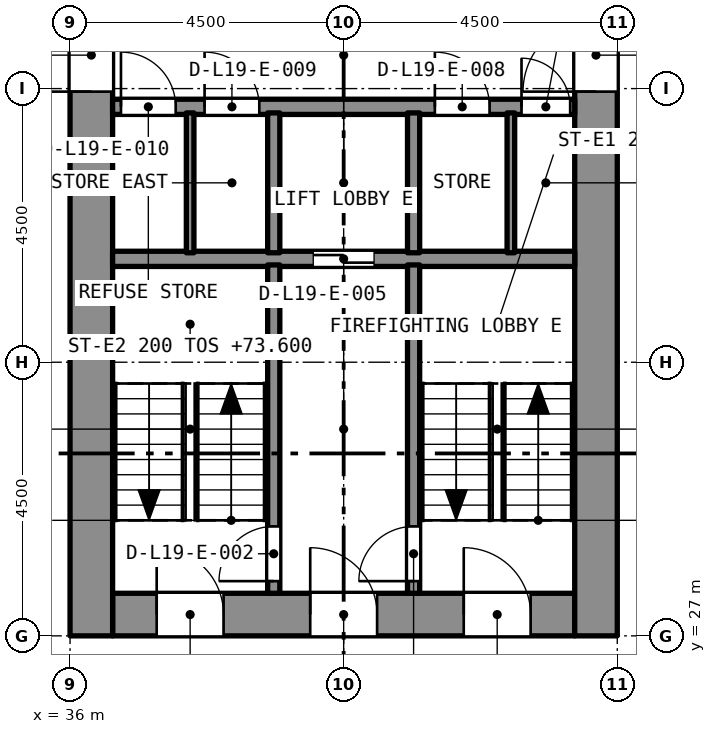
"""IFC4 building model, lengths in metres.
Left out: names, types, materials, properties, quantities, classifications, styles, units other than length and angle.
Written with IfcOpenShell. Run it as: python <this file> out.ifc"""

import sys

from ifc_helpers import new_model, si_unit, direction, frame, frame_2d, origin, place, context, subcontext, project, spatial, rectangle, extrude, element, fill, save


model = new_model("IFC4")
c1 = context("Model", 3, precision=1e-05, world=origin(), true_north=direction((0.0, 1.0)))
c2 = subcontext(c1, "Body", "Model", "MODEL_VIEW")
j1 = project(units=[si_unit("LENGTHUNIT", "METRE"), si_unit("PLANEANGLEUNIT", "RADIAN")], contexts=[c1])
p1 = place(None, origin())
s1 = spatial("IfcSite", under=j1, at=p1, CompositionType="ELEMENT")
p2 = place(p1, origin())
s2 = spatial("IfcBuilding", under=s1, at=p2, CompositionType="ELEMENT")
p3 = place(p2, frame((0.0, 0.0, 72.0)))
s3 = spatial("IfcBuildingStorey", under=s2, at=p3, CompositionType="ELEMENT", Elevation=72.0)
p4 = place(p3, frame((36.7, 27.35, 0.0), z_axis=(0.0, 0.0, 1.0), x_axis=(1.0, 0.0, 0.0)))
e1 = element("IfcWall", 1, at=p4, inside=s3, PredefinedType="SOLIDWALL", context=c2, shape_type="SweptSolid", body=[
    extrude(rectangle(XDim=7.6, YDim=0.7, at=frame_2d((3.8, 0.0))), origin(), (0.0, 0.0, 1.0), 3.2),
])
p5 = place(p4, frame((5.775, 0.0, 0.0)))
e2 = element("IfcOpeningElement", 2, at=p5, cuts=e1, PredefinedType="OPENING", context=c2, shape_type="SweptSolid", body=[
    extrude(rectangle(XDim=1.1, YDim=2.1, at=frame_2d((0.55, 1.05))), frame((0.0, 0.36, 0.0), z_axis=(0.0, -1.0, 0.0), x_axis=(1.0, 0.0, 0.0)), (0.0, 0.0, 1.0), 0.72),
])
p6 = place(p4, frame((3.25, 0.0, 0.0)))
e3 = element("IfcOpeningElement", 3, at=p6, cuts=e1, PredefinedType="OPENING", context=c2, shape_type="SweptSolid", body=[
    extrude(rectangle(XDim=1.1, YDim=2.1, at=frame_2d((0.55, 1.05))), frame((0.0, 0.36, 0.0), z_axis=(0.0, -1.0, 0.0), x_axis=(1.0, 0.0, 0.0)), (0.0, 0.0, 1.0), 0.72),
])
p7 = place(p4, frame((0.725, 0.0, 0.0)))
e4 = element("IfcOpeningElement", 4, at=p7, cuts=e1, PredefinedType="OPENING", context=c2, shape_type="SweptSolid", body=[
    extrude(rectangle(XDim=1.1, YDim=2.1, at=frame_2d((0.55, 1.05))), frame((0.0, 0.36, 0.0), z_axis=(0.0, -1.0, 0.0), x_axis=(1.0, 0.0, 0.0)), (0.0, 0.0, 1.0), 0.72),
])
p8 = place(p3, frame((36.35, 27.0, 0.0), z_axis=(0.0, 0.0, 1.0), x_axis=(0.0, 1.0, 0.0)))
e5 = element("IfcWall", 5, at=p8, inside=s3, PredefinedType="SOLIDWALL", context=c2, shape_type="SweptSolid", body=[
    extrude(rectangle(XDim=13.5, YDim=0.7, at=frame_2d((6.75, 0.0))), origin(), (0.0, 0.0, 1.0), 3.2),
])
p9 = place(p8, frame((8.95, 0.0, 0.0)))
e6 = element("IfcOpeningElement", 6, at=p9, cuts=e5, PredefinedType="OPENING", context=c2, shape_type="SweptSolid", body=[
    extrude(rectangle(XDim=1.2, YDim=2.1, at=frame_2d((0.6, 1.05))), frame((0.0, 0.36, 0.0), z_axis=(0.0, -1.0, 0.0), x_axis=(1.0, 0.0, 0.0)), (0.0, 0.0, 1.0), 0.72),
])
p10 = place(p3, frame((44.65, 27.0, 0.0), z_axis=(0.0, 0.0, 1.0), x_axis=(0.0, 1.0, 0.0)))
e7 = element("IfcWall", 7, at=p10, inside=s3, PredefinedType="SOLIDWALL", context=c2, shape_type="SweptSolid", body=[
    extrude(rectangle(XDim=13.5, YDim=0.7, at=frame_2d((6.75, 0.0))), origin(), (0.0, 0.0, 1.0), 3.2),
])
p11 = place(p10, frame((8.95, 0.0, 0.0)))
e8 = element("IfcOpeningElement", 8, at=p11, cuts=e7, PredefinedType="OPENING", context=c2, shape_type="SweptSolid", body=[
    extrude(rectangle(XDim=1.2, YDim=2.1, at=frame_2d((0.6, 1.05))), frame((0.0, 0.36, 0.0), z_axis=(0.0, -1.0, 0.0), x_axis=(1.0, 0.0, 0.0)), (0.0, 0.0, 1.0), 0.72),
])
p12 = place(p3, frame((36.7, 33.2, 0.0), z_axis=(0.0, 0.0, 1.0), x_axis=(1.0, 0.0, 0.0)))
e9 = element("IfcWall", 9, at=p12, inside=s3, PredefinedType="SOLIDWALL", context=c2, shape_type="SweptSolid", body=[
    extrude(rectangle(XDim=7.6, YDim=0.25, at=frame_2d((3.8, 0.0))), origin(), (0.0, 0.0, 1.0), 2.7),
])
p13 = place(p12, frame((3.3, 0.0, 0.0)))
e10 = element("IfcOpeningElement", 10, at=p13, cuts=e9, PredefinedType="OPENING", context=c2, shape_type="SweptSolid", body=[
    extrude(rectangle(XDim=1.0, YDim=2.1, at=frame_2d((0.5, 1.05))), frame((0.0, 0.135, 0.0), z_axis=(0.0, -1.0, 0.0), x_axis=(1.0, 0.0, 0.0)), (0.0, 0.0, 1.0), 0.27),
])
p14 = place(p3, frame((36.7, 35.7, 0.0), z_axis=(0.0, 0.0, 1.0), x_axis=(1.0, 0.0, 0.0)))
e11 = element("IfcWall", 11, at=p14, inside=s3, PredefinedType="SOLIDWALL", context=c2, shape_type="SweptSolid", body=[
    extrude(rectangle(XDim=7.6, YDim=0.25, at=frame_2d((3.8, 0.0))), origin(), (0.0, 0.0, 1.0), 2.7),
])
p15 = place(p14, frame((6.725, 0.0, 0.0)))
e12 = element("IfcOpeningElement", 12, at=p15, cuts=e11, PredefinedType="OPENING", context=c2, shape_type="SweptSolid", body=[
    extrude(rectangle(XDim=0.8, YDim=2.1, at=frame_2d((0.4, 1.05))), frame((0.0, 0.135, 0.0), z_axis=(0.0, -1.0, 0.0), x_axis=(1.0, 0.0, 0.0)), (0.0, 0.0, 1.0), 0.27),
])
p16 = place(p14, frame((5.3, 0.0, 0.0)))
e13 = element("IfcOpeningElement", 13, at=p16, cuts=e11, PredefinedType="OPENING", context=c2, shape_type="SweptSolid", body=[
    extrude(rectangle(XDim=0.9, YDim=2.1, at=frame_2d((0.45, 1.05))), frame((0.0, 0.135, 0.0), z_axis=(0.0, -1.0, 0.0), x_axis=(1.0, 0.0, 0.0)), (0.0, 0.0, 1.0), 0.27),
])
p17 = place(p14, frame((1.512, 0.0, 0.0)))
e14 = element("IfcOpeningElement", 14, at=p17, cuts=e11, PredefinedType="OPENING", context=c2, shape_type="SweptSolid", body=[
    extrude(rectangle(XDim=0.9, YDim=2.1, at=frame_2d((0.45, 1.05))), frame((0.0, 0.135, 0.0), z_axis=(0.0, -1.0, 0.0), x_axis=(1.0, 0.0, 0.0)), (0.0, 0.0, 1.0), 0.27),
])
p18 = place(p14, frame((0.137, 0.0, 0.0)))
e15 = element("IfcOpeningElement", 15, at=p18, cuts=e11, PredefinedType="OPENING", context=c2, shape_type="SweptSolid", body=[
    extrude(rectangle(XDim=0.9, YDim=2.1, at=frame_2d((0.45, 1.05))), frame((0.0, 0.135, 0.0), z_axis=(0.0, -1.0, 0.0), x_axis=(1.0, 0.0, 0.0)), (0.0, 0.0, 1.0), 0.27),
])
p19 = place(p3, frame((41.65, 27.7, 0.0), z_axis=(0.0, 0.0, 1.0), x_axis=(0.0, 1.0, 0.0)))
e16 = element("IfcWall", 16, at=p19, inside=s3, PredefinedType="SOLIDWALL", context=c2, shape_type="SweptSolid", body=[
    extrude(rectangle(XDim=5.4, YDim=0.2, at=frame_2d((2.7, 0.0))), origin(), (0.0, 0.0, 1.0), 2.7),
])
p20 = place(p19, frame((0.2, 0.0, 0.0)))
e17 = element("IfcOpeningElement", 17, at=p20, cuts=e16, PredefinedType="OPENING", context=c2, shape_type="SweptSolid", body=[
    extrude(rectangle(XDim=0.9, YDim=2.1, at=frame_2d((0.45, 1.05))), frame((0.0, 0.11, 0.0), z_axis=(0.0, -1.0, 0.0), x_axis=(1.0, 0.0, 0.0)), (0.0, 0.0, 1.0), 0.22),
])
p21 = place(p3, frame((39.35, 27.7, 0.0), z_axis=(0.0, 0.0, 1.0), x_axis=(0.0, 1.0, 0.0)))
e18 = element("IfcWall", 18, at=p21, inside=s3, PredefinedType="SOLIDWALL", context=c2, shape_type="SweptSolid", body=[
    extrude(rectangle(XDim=5.4, YDim=0.2, at=frame_2d((2.7, 0.0))), origin(), (0.0, 0.0, 1.0), 2.7),
])
p22 = place(p21, frame((0.2, 0.0, 0.0)))
e19 = element("IfcOpeningElement", 19, at=p22, cuts=e18, PredefinedType="OPENING", context=c2, shape_type="SweptSolid", body=[
    extrude(rectangle(XDim=0.9, YDim=2.1, at=frame_2d((0.45, 1.05))), frame((0.0, 0.11, 0.0), z_axis=(0.0, -1.0, 0.0), x_axis=(1.0, 0.0, 0.0)), (0.0, 0.0, 1.0), 0.22),
])
for number, where, z_axis, x_axis in (
    (20, (41.65, 33.3, 0.0), (0.0, 0.0, 1.0), (0.0, 1.0, 0.0)),
    (21, (39.35, 33.3, 0.0), (0.0, 0.0, 1.0), (0.0, 1.0, 0.0)),
):
    element("IfcWall", number, at=place(p3, frame(where, z_axis=z_axis, x_axis=x_axis)), inside=s3, PredefinedType="SOLIDWALL", context=c2, shape_type="SweptSolid", body=[
        extrude(rectangle(XDim=2.3, YDim=0.2, at=frame_2d((1.15, 0.0))), origin(), (0.0, 0.0, 1.0), 2.7),
    ])
for number, where, z_axis, x_axis in (
    (22, (43.25, 33.3, 0.0), (0.0, 0.0, 1.0), (0.0, 1.0, 0.0)),
    (23, (37.975, 33.3, 0.0), (0.0, 0.0, 1.0), (0.0, 1.0, 0.0)),
):
    element("IfcWall", number, at=place(p3, frame(where, z_axis=z_axis, x_axis=x_axis)), inside=s3, PredefinedType="PARTITIONING", context=c2, shape_type="SweptSolid", body=[
        extrude(rectangle(XDim=2.3, YDim=0.125, at=frame_2d((1.15, 0.0))), origin(), (0.0, 0.0, 1.0), 2.7),
    ])
p23 = place(p20, origin())
e24 = element("IfcDoor", 24, at=p23, inside=s3, OperationType="SINGLE_SWING_LEFT", PredefinedType="DOOR", context=c2, shape_type="SweptSolid", body=[
    extrude(rectangle(XDim=0.9, YDim=2.1, at=frame_2d((0.45, 1.05))), frame((0.0, 0.025, 0.0), z_axis=(0.0, -1.0, 0.0), x_axis=(1.0, 0.0, 0.0)), (0.0, 0.0, 1.0), 0.05),
])
fill(e17, e24)
p24 = place(p22, origin())
e25 = element("IfcDoor", 25, at=p24, inside=s3, OperationType="SINGLE_SWING_LEFT", PredefinedType="DOOR", context=c2, shape_type="SweptSolid", body=[
    extrude(rectangle(XDim=0.9, YDim=2.1, at=frame_2d((0.45, 1.05))), frame((0.0, 0.025, 0.0), z_axis=(0.0, -1.0, 0.0), x_axis=(1.0, 0.0, 0.0)), (0.0, 0.0, 1.0), 0.05),
])
fill(e19, e25)
p25 = place(p13, origin())
e26 = element("IfcDoor", 26, at=p25, inside=s3, OperationType="SLIDING_TO_LEFT", PredefinedType="DOOR", context=c2, shape_type="SweptSolid", body=[
    extrude(rectangle(XDim=1.0, YDim=2.1, at=frame_2d((0.5, 1.05))), frame((0.0, 0.025, 0.0), z_axis=(0.0, -1.0, 0.0), x_axis=(1.0, 0.0, 0.0)), (0.0, 0.0, 1.0), 0.05),
])
fill(e10, e26)
p26 = place(p15, origin())
e27 = element("IfcDoor", 27, at=p26, inside=s3, OperationType="SINGLE_SWING_LEFT", PredefinedType="DOOR", context=c2, shape_type="SweptSolid", body=[
    extrude(rectangle(XDim=0.8, YDim=2.1, at=frame_2d((0.4, 1.05))), frame((0.0, 0.025, 0.0), z_axis=(0.0, -1.0, 0.0), x_axis=(1.0, 0.0, 0.0)), (0.0, 0.0, 1.0), 0.05),
])
fill(e12, e27)
p27 = place(p16, origin())
e28 = element("IfcDoor", 28, at=p27, inside=s3, OperationType="SINGLE_SWING_LEFT", PredefinedType="DOOR", context=c2, shape_type="SweptSolid", body=[
    extrude(rectangle(XDim=0.9, YDim=2.1, at=frame_2d((0.45, 1.05))), frame((0.0, 0.025, 0.0), z_axis=(0.0, -1.0, 0.0), x_axis=(1.0, 0.0, 0.0)), (0.0, 0.0, 1.0), 0.05),
])
fill(e13, e28)
p28 = place(p17, origin())
e29 = element("IfcDoor", 29, at=p28, inside=s3, OperationType="SINGLE_SWING_LEFT", PredefinedType="DOOR", context=c2, shape_type="SweptSolid", body=[
    extrude(rectangle(XDim=0.9, YDim=2.1, at=frame_2d((0.45, 1.05))), frame((0.0, 0.025, 0.0), z_axis=(0.0, -1.0, 0.0), x_axis=(1.0, 0.0, 0.0)), (0.0, 0.0, 1.0), 0.05),
])
fill(e14, e29)
p29 = place(p18, origin())
e30 = element("IfcDoor", 30, at=p29, inside=s3, OperationType="SINGLE_SWING_LEFT", PredefinedType="DOOR", context=c2, shape_type="SweptSolid", body=[
    extrude(rectangle(XDim=0.9, YDim=2.1, at=frame_2d((0.45, 1.05))), frame((0.0, 0.025, 0.0), z_axis=(0.0, -1.0, 0.0), x_axis=(1.0, 0.0, 0.0)), (0.0, 0.0, 1.0), 0.05),
])
fill(e15, e30)
p30 = place(p5, origin())
e31 = element("IfcDoor", 31, at=p30, inside=s3, OperationType="SINGLE_SWING_LEFT", PredefinedType="DOOR", context=c2, shape_type="SweptSolid", body=[
    extrude(rectangle(XDim=1.1, YDim=2.1, at=frame_2d((0.55, 1.05))), frame((0.0, 0.025, 0.0), z_axis=(0.0, -1.0, 0.0), x_axis=(1.0, 0.0, 0.0)), (0.0, 0.0, 1.0), 0.05),
])
fill(e2, e31)
p31 = place(p6, origin())
e32 = element("IfcDoor", 32, at=p31, inside=s3, OperationType="SINGLE_SWING_LEFT", PredefinedType="DOOR", context=c2, shape_type="SweptSolid", body=[
    extrude(rectangle(XDim=1.1, YDim=2.1, at=frame_2d((0.55, 1.05))), frame((0.0, 0.025, 0.0), z_axis=(0.0, -1.0, 0.0), x_axis=(1.0, 0.0, 0.0)), (0.0, 0.0, 1.0), 0.05),
])
fill(e3, e32)
p32 = place(p7, origin())
e33 = element("IfcDoor", 33, at=p32, inside=s3, OperationType="SINGLE_SWING_LEFT", PredefinedType="DOOR", context=c2, shape_type="SweptSolid", body=[
    extrude(rectangle(XDim=1.1, YDim=2.1, at=frame_2d((0.55, 1.05))), frame((0.0, 0.025, 0.0), z_axis=(0.0, -1.0, 0.0), x_axis=(1.0, 0.0, 0.0)), (0.0, 0.0, 1.0), 0.05),
])
fill(e4, e33)
p33 = place(p9, origin())
e34 = element("IfcDoor", 34, at=p33, inside=s3, OperationType="SINGLE_SWING_LEFT", PredefinedType="DOOR", context=c2, shape_type="SweptSolid", body=[
    extrude(rectangle(XDim=1.2, YDim=2.1, at=frame_2d((0.6, 1.05))), frame((0.0, 0.025, 0.0), z_axis=(0.0, -1.0, 0.0), x_axis=(1.0, 0.0, 0.0)), (0.0, 0.0, 1.0), 0.05),
])
fill(e6, e34)
p34 = place(p11, origin())
e35 = element("IfcDoor", 35, at=p34, inside=s3, OperationType="SINGLE_SWING_LEFT", PredefinedType="DOOR", context=c2, shape_type="SweptSolid", body=[
    extrude(rectangle(XDim=1.2, YDim=2.1, at=frame_2d((0.6, 1.05))), frame((0.0, 0.025, 0.0), z_axis=(0.0, -1.0, 0.0), x_axis=(1.0, 0.0, 0.0)), (0.0, 0.0, 1.0), 0.05),
])
fill(e8, e35)
save(model, sys.argv[1])
